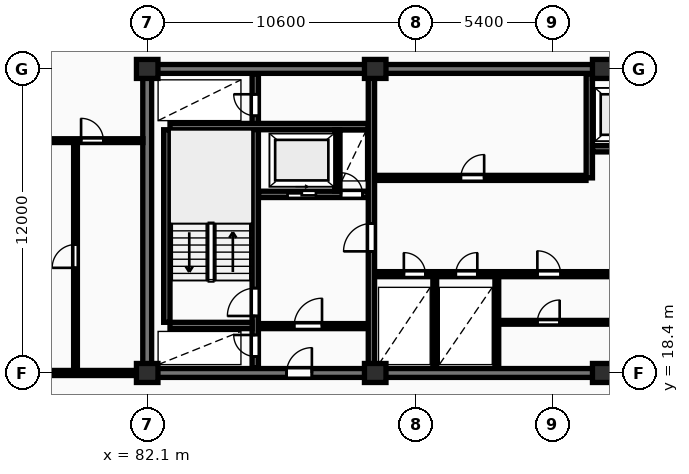
"""IFC4 building model, lengths in metres.
Left out: names, types, materials, properties, quantities, classifications, styles, units other than length and angle.
Written with IfcOpenShell. Run it as: python <this file> out.ifc"""

import sys

from ifc_helpers import new_model, si_unit, direction, frame, frame_2d, origin, origin_2d, place, context, subcontext, project, spatial, rectangle, extrude, element, fill, save


model = new_model("IFC4")
c1 = context("Model", 3, precision=1e-05, world=origin(), true_north=direction((0.0, 1.0)))
c2 = subcontext(c1, "Body", "Model", "MODEL_VIEW")
j1 = project(units=[si_unit("LENGTHUNIT", "METRE"), si_unit("PLANEANGLEUNIT", "RADIAN")], contexts=[c1])
p1 = place(None, origin())
s1 = spatial("IfcSite", under=j1, at=p1, CompositionType="ELEMENT")
p2 = place(p1, origin())
s2 = spatial("IfcBuilding", under=s1, at=p2, CompositionType="ELEMENT")
p3 = place(p2, frame((0.0, 0.0, 100.3)))
s3 = spatial("IfcBuildingStorey", under=s2, at=p3, CompositionType="ELEMENT", Elevation=100.3)
for number, where, z_axis, x_axis in (
    (1, (82.1, 18.4, 0.0), (0.0, 0.0, 1.0), (1.0, 0.0, 0.0)),
    (2, (82.1, 30.4, 0.0), (0.0, 0.0, 1.0), (1.0, 0.0, 0.0)),
    (3, (91.1, 18.4, 0.0), (0.0, 0.0, 1.0), (1.0, 0.0, 0.0)),
    (4, (91.1, 30.4, 0.0), (0.0, 0.0, 1.0), (1.0, 0.0, 0.0)),
    (5, (100.1, 18.4, 0.0), (0.0, 0.0, 1.0), (1.0, 0.0, 0.0)),
    (6, (100.1, 30.4, 0.0), (0.0, 0.0, 1.0), (1.0, 0.0, 0.0)),
):
    element("IfcColumn", number, at=place(p3, frame(where, z_axis=z_axis, x_axis=x_axis)), inside=s3, PredefinedType="COLUMN", context=c2, shape_type="SweptSolid", body=[
        extrude(rectangle(XDim=0.85, YDim=0.75, at=origin_2d()), origin(), (0.0, 0.0, 1.0), 3.25),
    ])
p4 = place(p3, frame((81.925, 30.4, 0.0), z_axis=(0.0, 0.0, 1.0), x_axis=(1.0, 0.0, 0.0)))
e7 = element("IfcWall", 7, at=p4, inside=s3, PredefinedType="SHEAR", context=c2, shape_type="SweptSolid", body=[
    extrude(rectangle(XDim=36.265, YDim=0.35, at=frame_2d((18.132, 0.0))), origin(), (0.0, 0.0, 1.0), 3.25),
])
p5 = place(p3, frame((82.1, 18.575, 0.0), z_axis=(0.0, 0.0, 1.0), x_axis=(0.0, 1.0, 0.0)))
e8 = element("IfcWall", 8, at=p5, inside=s3, PredefinedType="SHEAR", context=c2, shape_type="SweptSolid", body=[
    extrude(rectangle(XDim=11.65, YDim=0.35, at=frame_2d((5.825, 0.0))), origin(), (0.0, 0.0, 1.0), 3.25),
])
p6 = place(p3, frame((81.925, 18.4, 0.0), z_axis=(0.0, 0.0, 1.0), x_axis=(1.0, 0.0, 0.0)))
e9 = element("IfcWall", 9, at=p6, inside=s3, PredefinedType="SHEAR", context=c2, shape_type="SweptSolid", body=[
    extrude(rectangle(XDim=36.265, YDim=0.35, at=frame_2d((18.132, 0.0))), origin(), (0.0, 0.0, 1.0), 3.25),
])
p7 = place(p6, frame((5.675, 0.0, 0.0)))
e10 = element("IfcOpeningElement", 10, at=p7, cuts=e9, PredefinedType="OPENING", context=c2, shape_type="SweptSolid", body=[
    extrude(rectangle(XDim=1.0, YDim=2.15, at=frame_2d((0.5, 1.075))), frame((0.0, 0.185, 0.0), z_axis=(0.0, -1.0, 0.0), x_axis=(1.0, 0.0, 0.0)), (0.0, 0.0, 1.0), 0.37),
])
p8 = place(p6, frame((21.925, 0.0, 0.0)))
e11 = element("IfcOpeningElement", 11, at=p8, cuts=e9, PredefinedType="OPENING", context=c2, shape_type="SweptSolid", body=[
    extrude(rectangle(XDim=1.5, YDim=2.2, at=frame_2d((0.75, 1.1))), frame((0.0, 0.185, 0.0), z_axis=(0.0, -1.0, 0.0), x_axis=(1.0, 0.0, 0.0)), (0.0, 0.0, 1.0), 0.37),
])
p9 = place(p6, frame((29.875, 0.0, 0.0)))
e12 = element("IfcOpeningElement", 12, at=p9, cuts=e9, PredefinedType="OPENING", context=c2, shape_type="SweptSolid", body=[
    extrude(rectangle(XDim=1.0, YDim=2.15, at=frame_2d((0.5, 1.075))), frame((0.0, 0.185, 0.0), z_axis=(0.0, -1.0, 0.0), x_axis=(1.0, 0.0, 0.0)), (0.0, 0.0, 1.0), 0.37),
])
p10 = place(p3, frame((82.875, 20.4, 0.0), z_axis=(0.0, 0.0, 1.0), x_axis=(0.0, 1.0, 0.0)))
e13 = element("IfcWall", 13, at=p10, inside=s3, PredefinedType="SHEAR", context=c2, shape_type="SweptSolid", body=[
    extrude(rectangle(XDim=7.6, YDim=0.25, at=frame_2d((3.8, 0.0))), origin(), (0.0, 0.0, 1.0), 3.25),
])
p11 = place(p3, frame((86.365, 18.6, 0.0), z_axis=(0.0, 0.0, 1.0), x_axis=(0.0, 1.0, 0.0)))
e14 = element("IfcWall", 14, at=p11, inside=s3, PredefinedType="SHEAR", context=c2, shape_type="SweptSolid", body=[
    extrude(rectangle(XDim=11.6, YDim=0.25, at=frame_2d((5.8, 0.0))), origin(), (0.0, 0.0, 1.0), 3.25),
])
p12 = place(p11, frame((0.45, 0.0, 0.0)))
e15 = element("IfcOpeningElement", 15, at=p12, cuts=e14, PredefinedType="OPENING", context=c2, shape_type="SweptSolid", body=[
    extrude(rectangle(XDim=0.85, YDim=2.05, at=frame_2d((0.425, 1.025))), frame((0.0, 0.135, 0.0), z_axis=(0.0, -1.0, 0.0), x_axis=(1.0, 0.0, 0.0)), (0.0, 0.0, 1.0), 0.27),
])
p13 = place(p11, frame((2.05, 0.0, 0.0)))
e16 = element("IfcOpeningElement", 16, at=p13, cuts=e14, PredefinedType="OPENING", context=c2, shape_type="SweptSolid", body=[
    extrude(rectangle(XDim=1.1, YDim=2.1, at=frame_2d((0.55, 1.05))), frame((0.0, 0.135, 0.0), z_axis=(0.0, -1.0, 0.0), x_axis=(1.0, 0.0, 0.0)), (0.0, 0.0, 1.0), 0.27),
])
p14 = place(p11, frame((9.95, 0.0, 0.0)))
e17 = element("IfcOpeningElement", 17, at=p14, cuts=e14, PredefinedType="OPENING", context=c2, shape_type="SweptSolid", body=[
    extrude(rectangle(XDim=0.85, YDim=2.05, at=frame_2d((0.425, 1.025))), frame((0.0, 0.135, 0.0), z_axis=(0.0, -1.0, 0.0), x_axis=(1.0, 0.0, 0.0)), (0.0, 0.0, 1.0), 0.27),
])
p15 = place(p3, frame((83.0, 20.275, 0.0), z_axis=(0.0, 0.0, 1.0), x_axis=(1.0, 0.0, 0.0)))
e18 = element("IfcWall", 18, at=p15, inside=s3, PredefinedType="SHEAR", context=c2, shape_type="SweptSolid", body=[
    extrude(rectangle(XDim=3.24, YDim=0.25, at=frame_2d((1.62, 0.0))), origin(), (0.0, 0.0, 1.0), 3.25),
])
p16 = place(p3, frame((83.0, 28.125, 0.0), z_axis=(0.0, 0.0, 1.0), x_axis=(1.0, 0.0, 0.0)))
e19 = element("IfcWall", 19, at=p16, inside=s3, PredefinedType="SHEAR", context=c2, shape_type="SweptSolid", body=[
    extrude(rectangle(XDim=7.82, YDim=0.25, at=frame_2d((3.91, 0.0))), origin(), (0.0, 0.0, 1.0), 3.25),
])
p17 = place(p3, frame((86.5, 25.45, 0.0), z_axis=(0.0, 0.0, 1.0), x_axis=(1.0, 0.0, 0.0)))
e20 = element("IfcWall", 20, at=p17, inside=s3, PredefinedType="SHEAR", context=c2, shape_type="SweptSolid", body=[
    extrude(rectangle(XDim=4.32, YDim=0.25, at=frame_2d((2.16, 0.0))), origin(), (0.0, 0.0, 1.0), 3.25),
])
p18 = place(p17, frame((1.14, 0.0, 0.0)))
e21 = element("IfcOpeningElement", 21, at=p18, cuts=e20, PredefinedType="OPENING", context=c2, shape_type="SweptSolid", body=[
    extrude(rectangle(XDim=1.12, YDim=2.12, at=frame_2d((0.56, 1.06))), frame((0.0, 0.135, 0.0), z_axis=(0.0, -1.0, 0.0), x_axis=(1.0, 0.0, 0.0)), (0.0, 0.0, 1.0), 0.27),
])
p19 = place(p17, frame((3.25, 0.0, 0.0)))
e22 = element("IfcOpeningElement", 22, at=p19, cuts=e20, PredefinedType="OPENING", context=c2, shape_type="SweptSolid", body=[
    extrude(rectangle(XDim=0.85, YDim=2.05, at=frame_2d((0.425, 1.025))), frame((0.0, 0.135, 0.0), z_axis=(0.0, -1.0, 0.0), x_axis=(1.0, 0.0, 0.0)), (0.0, 0.0, 1.0), 0.27),
])
p20 = place(p3, frame((89.6, 25.58, 0.0), z_axis=(0.0, 0.0, 1.0), x_axis=(0.0, 1.0, 0.0)))
e23 = element("IfcWall", 23, at=p20, inside=s3, PredefinedType="PARTITIONING", context=c2, shape_type="SweptSolid", body=[
    extrude(rectangle(XDim=2.42, YDim=0.2, at=frame_2d((1.21, 0.0))), origin(), (0.0, 0.0, 1.0), 2.97),
])
p21 = place(p3, frame((86.5, 20.25, 0.0), z_axis=(0.0, 0.0, 1.0), x_axis=(1.0, 0.0, 0.0)))
e24 = element("IfcWall", 24, at=p21, inside=s3, PredefinedType="PARTITIONING", context=c2, shape_type="SweptSolid", body=[
    extrude(rectangle(XDim=4.32, YDim=0.2, at=frame_2d((2.16, 0.0))), origin(), (0.0, 0.0, 1.0), 2.97),
])
p22 = place(p21, frame((1.4, 0.0, 0.0)))
e25 = element("IfcOpeningElement", 25, at=p22, cuts=e24, PredefinedType="OPENING", context=c2, shape_type="SweptSolid", body=[
    extrude(rectangle(XDim=1.1, YDim=2.1, at=frame_2d((0.55, 1.05))), frame((0.0, 0.11, 0.0), z_axis=(0.0, -1.0, 0.0), x_axis=(1.0, 0.0, 0.0)), (0.0, 0.0, 1.0), 0.22),
])
p23 = place(p3, frame((90.95, 18.6, 0.0), z_axis=(0.0, 0.0, 1.0), x_axis=(0.0, 1.0, 0.0)))
e26 = element("IfcWall", 26, at=p23, inside=s3, PredefinedType="SHEAR", context=c2, shape_type="SweptSolid", body=[
    extrude(rectangle(XDim=11.6, YDim=0.25, at=frame_2d((5.8, 0.0))), origin(), (0.0, 0.0, 1.0), 3.25),
])
p24 = place(p23, frame((4.6, 0.0, 0.0)))
e27 = element("IfcOpeningElement", 27, at=p24, cuts=e26, PredefinedType="OPENING", context=c2, shape_type="SweptSolid", body=[
    extrude(rectangle(XDim=1.1, YDim=2.1, at=frame_2d((0.55, 1.05))), frame((0.0, 0.135, 0.0), z_axis=(0.0, -1.0, 0.0), x_axis=(1.0, 0.0, 0.0)), (0.0, 0.0, 1.0), 0.27),
])
p25 = place(p3, frame((91.08, 26.1, 0.0), z_axis=(0.0, 0.0, 1.0), x_axis=(1.0, 0.0, 0.0)))
e28 = element("IfcWall", 28, at=p25, inside=s3, PredefinedType="PARTITIONING", context=c2, shape_type="SweptSolid", body=[
    extrude(rectangle(XDim=8.34, YDim=0.2, at=frame_2d((4.17, 0.0))), origin(), (0.0, 0.0, 1.0), 2.97),
])
p26 = place(p25, frame((3.4, 0.0, 0.0)))
e29 = element("IfcOpeningElement", 29, at=p26, cuts=e28, PredefinedType="OPENING", context=c2, shape_type="SweptSolid", body=[
    extrude(rectangle(XDim=0.92, YDim=2.08, at=frame_2d((0.46, 1.04))), frame((0.0, 0.11, 0.0), z_axis=(0.0, -1.0, 0.0), x_axis=(1.0, 0.0, 0.0)), (0.0, 0.0, 1.0), 0.22),
])
p27 = place(p3, frame((99.55, 26.1, 0.0), z_axis=(0.0, 0.0, 1.0), x_axis=(0.0, 1.0, 0.0)))
e30 = element("IfcWall", 30, at=p27, inside=s3, PredefinedType="SHEAR", context=c2, shape_type="SweptSolid", body=[
    extrude(rectangle(XDim=4.1, YDim=0.25, at=frame_2d((2.05, 0.0))), origin(), (0.0, 0.0, 1.0), 3.25),
])
p28 = place(p3, frame((99.68, 27.25, 0.0), z_axis=(0.0, 0.0, 1.0), x_axis=(1.0, 0.0, 0.0)))
e31 = element("IfcWall", 31, at=p28, inside=s3, PredefinedType="SHEAR", context=c2, shape_type="SweptSolid", body=[
    extrude(rectangle(XDim=10.54, YDim=0.25, at=frame_2d((5.27, 0.0))), origin(), (0.0, 0.0, 1.0), 3.25),
])
p29 = place(p28, frame((0.76, 0.0, 0.0)))
e32 = element("IfcOpeningElement", 32, at=p29, cuts=e31, PredefinedType="OPENING", context=c2, shape_type="SweptSolid", body=[
    extrude(rectangle(XDim=1.12, YDim=2.12, at=frame_2d((0.56, 1.06))), frame((0.0, 0.135, 0.0), z_axis=(0.0, -1.0, 0.0), x_axis=(1.0, 0.0, 0.0)), (0.0, 0.0, 1.0), 0.27),
])
p30 = place(p28, frame((3.56, 0.0, 0.0)))
e33 = element("IfcOpeningElement", 33, at=p30, cuts=e31, PredefinedType="OPENING", context=c2, shape_type="SweptSolid", body=[
    extrude(rectangle(XDim=1.12, YDim=2.12, at=frame_2d((0.56, 1.06))), frame((0.0, 0.135, 0.0), z_axis=(0.0, -1.0, 0.0), x_axis=(1.0, 0.0, 0.0)), (0.0, 0.0, 1.0), 0.27),
])
p31 = place(p28, frame((6.36, 0.0, 0.0)))
e34 = element("IfcOpeningElement", 34, at=p31, cuts=e31, PredefinedType="OPENING", context=c2, shape_type="SweptSolid", body=[
    extrude(rectangle(XDim=1.12, YDim=2.12, at=frame_2d((0.56, 1.06))), frame((0.0, 0.135, 0.0), z_axis=(0.0, -1.0, 0.0), x_axis=(1.0, 0.0, 0.0)), (0.0, 0.0, 1.0), 0.27),
])
p32 = place(p28, frame((8.92, 0.0, 0.0)))
e35 = element("IfcOpeningElement", 35, at=p32, cuts=e31, PredefinedType="OPENING", context=c2, shape_type="SweptSolid", body=[
    extrude(rectangle(XDim=0.85, YDim=2.05, at=frame_2d((0.425, 1.025))), frame((0.0, 0.135, 0.0), z_axis=(0.0, -1.0, 0.0), x_axis=(1.0, 0.0, 0.0)), (0.0, 0.0, 1.0), 0.27),
])
for number, where, z_axis, x_axis in (
    (36, (93.45, 18.6, 0.0), (0.0, 0.0, 1.0), (0.0, 1.0, 0.0)),
    (37, (95.9, 18.6, 0.0), (0.0, 0.0, 1.0), (0.0, 1.0, 0.0)),
):
    element("IfcWall", number, at=place(p3, frame(where, z_axis=z_axis, x_axis=x_axis)), inside=s3, PredefinedType="PARTITIONING", context=c2, shape_type="SweptSolid", body=[
        extrude(rectangle(XDim=3.6, YDim=0.15, at=frame_2d((1.8, 0.0))), origin(), (0.0, 0.0, 1.0), 2.97),
    ])
p33 = place(p3, frame((95.9, 20.4, 0.0), z_axis=(0.0, 0.0, 1.0), x_axis=(1.0, 0.0, 0.0)))
e38 = element("IfcWall", 38, at=p33, inside=s3, PredefinedType="PARTITIONING", context=c2, shape_type="SweptSolid", body=[
    extrude(rectangle(XDim=6.7, YDim=0.15, at=frame_2d((3.35, 0.0))), origin(), (0.0, 0.0, 1.0), 2.97),
])
p34 = place(p33, frame((1.6, 0.0, 0.0)))
e39 = element("IfcOpeningElement", 39, at=p34, cuts=e38, PredefinedType="OPENING", context=c2, shape_type="SweptSolid", body=[
    extrude(rectangle(XDim=0.88, YDim=2.06, at=frame_2d((0.44, 1.03))), frame((0.0, 0.085, 0.0), z_axis=(0.0, -1.0, 0.0), x_axis=(1.0, 0.0, 0.0)), (0.0, 0.0, 1.0), 0.17),
])
p35 = place(p3, frame((91.08, 22.3, 0.0), z_axis=(0.0, 0.0, 1.0), x_axis=(1.0, 0.0, 0.0)))
e40 = element("IfcWall", 40, at=p35, inside=s3, PredefinedType="PARTITIONING", context=c2, shape_type="SweptSolid", body=[
    extrude(rectangle(XDim=19.14, YDim=0.2, at=frame_2d((9.57, 0.0))), origin(), (0.0, 0.0, 1.0), 2.97),
])
p36 = place(p35, frame((1.15, 0.0, 0.0)))
e41 = element("IfcOpeningElement", 41, at=p36, cuts=e40, PredefinedType="OPENING", context=c2, shape_type="SweptSolid", body=[
    extrude(rectangle(XDim=0.85, YDim=2.05, at=frame_2d((0.425, 1.025))), frame((0.0, 0.11, 0.0), z_axis=(0.0, -1.0, 0.0), x_axis=(1.0, 0.0, 0.0)), (0.0, 0.0, 1.0), 0.22),
])
p37 = place(p35, frame((3.2, 0.0, 0.0)))
e42 = element("IfcOpeningElement", 42, at=p37, cuts=e40, PredefinedType="OPENING", context=c2, shape_type="SweptSolid", body=[
    extrude(rectangle(XDim=0.85, YDim=2.05, at=frame_2d((0.425, 1.025))), frame((0.0, 0.11, 0.0), z_axis=(0.0, -1.0, 0.0), x_axis=(1.0, 0.0, 0.0)), (0.0, 0.0, 1.0), 0.22),
])
p38 = place(p35, frame((12.72, 0.0, 0.0)))
e43 = element("IfcOpeningElement", 43, at=p38, cuts=e40, PredefinedType="OPENING", context=c2, shape_type="SweptSolid", body=[
    extrude(rectangle(XDim=1.5, YDim=2.2, at=frame_2d((0.75, 1.1))), frame((0.0, 0.11, 0.0), z_axis=(0.0, -1.0, 0.0), x_axis=(1.0, 0.0, 0.0)), (0.0, 0.0, 1.0), 0.22),
])
p39 = place(p35, frame((6.42, 0.0, 0.0)))
e44 = element("IfcOpeningElement", 44, at=p39, cuts=e40, PredefinedType="OPENING", context=c2, shape_type="SweptSolid", body=[
    extrude(rectangle(XDim=0.92, YDim=2.08, at=frame_2d((0.46, 1.04))), frame((0.0, 0.11, 0.0), z_axis=(0.0, -1.0, 0.0), x_axis=(1.0, 0.0, 0.0)), (0.0, 0.0, 1.0), 0.22),
])
p40 = place(p35, frame((15.92, 0.0, 0.0)))
e45 = element("IfcOpeningElement", 45, at=p40, cuts=e40, PredefinedType="OPENING", context=c2, shape_type="SweptSolid", body=[
    extrude(rectangle(XDim=0.88, YDim=2.06, at=frame_2d((0.44, 1.03))), frame((0.0, 0.11, 0.0), z_axis=(0.0, -1.0, 0.0), x_axis=(1.0, 0.0, 0.0)), (0.0, 0.0, 1.0), 0.22),
])
p41 = place(p3, frame((79.27, 18.45, 0.0), z_axis=(0.0, 0.0, 1.0), x_axis=(0.0, 1.0, 0.0)))
e46 = element("IfcWall", 46, at=p41, inside=s3, PredefinedType="PARTITIONING", context=c2, shape_type="SweptSolid", body=[
    extrude(rectangle(XDim=9.12, YDim=0.15, at=frame_2d((4.56, 0.0))), origin(), (0.0, 0.0, 1.0), 2.97),
])
p42 = place(p41, frame((4.1, 0.0, 0.0)))
e47 = element("IfcOpeningElement", 47, at=p42, cuts=e46, PredefinedType="OPENING", context=c2, shape_type="SweptSolid", body=[
    extrude(rectangle(XDim=0.92, YDim=2.08, at=frame_2d((0.46, 1.04))), frame((0.0, 0.085, 0.0), z_axis=(0.0, -1.0, 0.0), x_axis=(1.0, 0.0, 0.0)), (0.0, 0.0, 1.0), 0.17),
])
p43 = place(p3, frame((75.17, 27.57, 0.0), z_axis=(0.0, 0.0, 1.0), x_axis=(1.0, 0.0, 0.0)))
e48 = element("IfcWall", 48, at=p43, inside=s3, PredefinedType="PARTITIONING", context=c2, shape_type="SweptSolid", body=[
    extrude(rectangle(XDim=6.76, YDim=0.15, at=frame_2d((3.38, 0.0))), origin(), (0.0, 0.0, 1.0), 2.97),
])
p44 = place(p43, frame((1.266, 0.0, 0.0)))
e49 = element("IfcOpeningElement", 49, at=p44, cuts=e48, PredefinedType="OPENING", context=c2, shape_type="SweptSolid", body=[
    extrude(rectangle(XDim=0.84, YDim=2.04, at=frame_2d((0.42, 1.02))), frame((0.0, 0.085, 0.0), z_axis=(0.0, -1.0, 0.0), x_axis=(1.0, 0.0, 0.0)), (0.0, 0.0, 1.0), 0.17),
])
p45 = place(p43, frame((4.32, 0.0, 0.0)))
e50 = element("IfcOpeningElement", 50, at=p45, cuts=e48, PredefinedType="OPENING", context=c2, shape_type="SweptSolid", body=[
    extrude(rectangle(XDim=0.88, YDim=2.06, at=frame_2d((0.44, 1.03))), frame((0.0, 0.085, 0.0), z_axis=(0.0, -1.0, 0.0), x_axis=(1.0, 0.0, 0.0)), (0.0, 0.0, 1.0), 0.17),
])
p46 = place(p3, frame((72.7, 18.4, 0.0), z_axis=(0.0, 0.0, 1.0), x_axis=(1.0, 0.0, 0.0)))
e51 = element("IfcWall", 51, at=p46, inside=s3, PredefinedType="PARTITIONING", context=c2, shape_type="SweptSolid", body=[
    extrude(rectangle(XDim=9.25, YDim=0.2, at=frame_2d((4.625, 0.0))), origin(), (0.0, 0.0, 1.0), 2.358),
])
p47 = place(p46, frame((4.15, 0.0, 0.0)))
e52 = element("IfcOpeningElement", 52, at=p47, cuts=e51, PredefinedType="OPENING", context=c2, shape_type="SweptSolid", body=[
    extrude(rectangle(XDim=0.95, YDim=2.15, at=frame_2d((0.475, 1.075))), frame((0.0, 0.11, 0.0), z_axis=(0.0, -1.0, 0.0), x_axis=(1.0, 0.0, 0.0)), (0.0, 0.0, 1.0), 0.22),
])
p48 = place(p7, origin())
e53 = element("IfcDoor", 53, at=p48, inside=s3, OperationType="SINGLE_SWING_RIGHT", PredefinedType="DOOR", context=c2, shape_type="SweptSolid", body=[
    extrude(rectangle(XDim=1.0, YDim=2.15, at=frame_2d((0.5, 1.075))), frame((0.0, 0.025, 0.0), z_axis=(0.0, -1.0, 0.0), x_axis=(1.0, 0.0, 0.0)), (0.0, 0.0, 1.0), 0.05),
])
fill(e10, e53)
p49 = place(p12, origin())
e54 = element("IfcDoor", 54, at=p49, inside=s3, OperationType="SINGLE_SWING_RIGHT", PredefinedType="DOOR", context=c2, shape_type="SweptSolid", body=[
    extrude(rectangle(XDim=0.85, YDim=2.05, at=frame_2d((0.425, 1.025))), frame((0.0, 0.025, 0.0), z_axis=(0.0, -1.0, 0.0), x_axis=(1.0, 0.0, 0.0)), (0.0, 0.0, 1.0), 0.05),
])
fill(e15, e54)
p50 = place(p13, origin())
e55 = element("IfcDoor", 55, at=p50, inside=s3, OperationType="SINGLE_SWING_LEFT", PredefinedType="DOOR", context=c2, shape_type="SweptSolid", body=[
    extrude(rectangle(XDim=1.1, YDim=2.1, at=frame_2d((0.55, 1.05))), frame((0.0, 0.025, 0.0), z_axis=(0.0, -1.0, 0.0), x_axis=(1.0, 0.0, 0.0)), (0.0, 0.0, 1.0), 0.05),
])
fill(e16, e55)
p51 = place(p14, origin())
e56 = element("IfcDoor", 56, at=p51, inside=s3, OperationType="SINGLE_SWING_RIGHT", PredefinedType="DOOR", context=c2, shape_type="SweptSolid", body=[
    extrude(rectangle(XDim=0.85, YDim=2.05, at=frame_2d((0.425, 1.025))), frame((0.0, 0.025, 0.0), z_axis=(0.0, -1.0, 0.0), x_axis=(1.0, 0.0, 0.0)), (0.0, 0.0, 1.0), 0.05),
])
fill(e17, e56)
p52 = place(p18, origin())
e57 = element("IfcDoor", 57, at=p52, inside=s3, OperationType="SLIDING_TO_RIGHT", PredefinedType="DOOR", context=c2, shape_type="SweptSolid", body=[
    extrude(rectangle(XDim=1.12, YDim=2.12, at=frame_2d((0.56, 1.06))), frame((0.0, 0.025, 0.0), z_axis=(0.0, -1.0, 0.0), x_axis=(1.0, 0.0, 0.0)), (0.0, 0.0, 1.0), 0.05),
])
fill(e21, e57)
p53 = place(p19, origin())
e58 = element("IfcDoor", 58, at=p53, inside=s3, OperationType="SINGLE_SWING_LEFT", PredefinedType="DOOR", context=c2, shape_type="SweptSolid", body=[
    extrude(rectangle(XDim=0.85, YDim=2.05, at=frame_2d((0.425, 1.025))), frame((0.0, 0.025, 0.0), z_axis=(0.0, -1.0, 0.0), x_axis=(1.0, 0.0, 0.0)), (0.0, 0.0, 1.0), 0.05),
])
fill(e22, e58)
p54 = place(p22, origin())
e59 = element("IfcDoor", 59, at=p54, inside=s3, OperationType="SINGLE_SWING_RIGHT", PredefinedType="DOOR", context=c2, shape_type="SweptSolid", body=[
    extrude(rectangle(XDim=1.1, YDim=2.1, at=frame_2d((0.55, 1.05))), frame((0.0, 0.025, 0.0), z_axis=(0.0, -1.0, 0.0), x_axis=(1.0, 0.0, 0.0)), (0.0, 0.0, 1.0), 0.05),
])
fill(e25, e59)
p55 = place(p24, origin())
e60 = element("IfcDoor", 60, at=p55, inside=s3, OperationType="SINGLE_SWING_LEFT", PredefinedType="DOOR", context=c2, shape_type="SweptSolid", body=[
    extrude(rectangle(XDim=1.1, YDim=2.1, at=frame_2d((0.55, 1.05))), frame((0.0, 0.025, 0.0), z_axis=(0.0, -1.0, 0.0), x_axis=(1.0, 0.0, 0.0)), (0.0, 0.0, 1.0), 0.05),
])
fill(e27, e60)
p56 = place(p26, origin())
e61 = element("IfcDoor", 61, at=p56, inside=s3, OperationType="SINGLE_SWING_RIGHT", PredefinedType="DOOR", context=c2, shape_type="SweptSolid", body=[
    extrude(rectangle(XDim=0.92, YDim=2.08, at=frame_2d((0.46, 1.04))), frame((0.0, 0.025, 0.0), z_axis=(0.0, -1.0, 0.0), x_axis=(1.0, 0.0, 0.0)), (0.0, 0.0, 1.0), 0.05),
])
fill(e29, e61)
p57 = place(p34, origin())
e62 = element("IfcDoor", 62, at=p57, inside=s3, OperationType="SINGLE_SWING_RIGHT", PredefinedType="DOOR", context=c2, shape_type="SweptSolid", body=[
    extrude(rectangle(XDim=0.88, YDim=2.06, at=frame_2d((0.44, 1.03))), frame((0.0, 0.025, 0.0), z_axis=(0.0, -1.0, 0.0), x_axis=(1.0, 0.0, 0.0)), (0.0, 0.0, 1.0), 0.05),
])
fill(e39, e62)
p58 = place(p36, origin())
e63 = element("IfcDoor", 63, at=p58, inside=s3, OperationType="SINGLE_SWING_LEFT", PredefinedType="DOOR", context=c2, shape_type="SweptSolid", body=[
    extrude(rectangle(XDim=0.85, YDim=2.05, at=frame_2d((0.425, 1.025))), frame((0.0, 0.025, 0.0), z_axis=(0.0, -1.0, 0.0), x_axis=(1.0, 0.0, 0.0)), (0.0, 0.0, 1.0), 0.05),
])
fill(e41, e63)
p59 = place(p37, origin())
e64 = element("IfcDoor", 64, at=p59, inside=s3, OperationType="SINGLE_SWING_RIGHT", PredefinedType="DOOR", context=c2, shape_type="SweptSolid", body=[
    extrude(rectangle(XDim=0.85, YDim=2.05, at=frame_2d((0.425, 1.025))), frame((0.0, 0.025, 0.0), z_axis=(0.0, -1.0, 0.0), x_axis=(1.0, 0.0, 0.0)), (0.0, 0.0, 1.0), 0.05),
])
fill(e42, e64)
p60 = place(p39, origin())
e65 = element("IfcDoor", 65, at=p60, inside=s3, OperationType="SINGLE_SWING_LEFT", PredefinedType="DOOR", context=c2, shape_type="SweptSolid", body=[
    extrude(rectangle(XDim=0.92, YDim=2.08, at=frame_2d((0.46, 1.04))), frame((0.0, 0.025, 0.0), z_axis=(0.0, -1.0, 0.0), x_axis=(1.0, 0.0, 0.0)), (0.0, 0.0, 1.0), 0.05),
])
fill(e44, e65)
p61 = place(p42, origin())
e66 = element("IfcDoor", 66, at=p61, inside=s3, OperationType="SINGLE_SWING_LEFT", PredefinedType="DOOR", context=c2, shape_type="SweptSolid", body=[
    extrude(rectangle(XDim=0.92, YDim=2.08, at=frame_2d((0.46, 1.04))), frame((0.0, 0.025, 0.0), z_axis=(0.0, -1.0, 0.0), x_axis=(1.0, 0.0, 0.0)), (0.0, 0.0, 1.0), 0.05),
])
fill(e47, e66)
p62 = place(p45, origin())
e67 = element("IfcDoor", 67, at=p62, inside=s3, OperationType="SINGLE_SWING_LEFT", PredefinedType="DOOR", context=c2, shape_type="SweptSolid", body=[
    extrude(rectangle(XDim=0.88, YDim=2.06, at=frame_2d((0.44, 1.03))), frame((0.0, 0.025, 0.0), z_axis=(0.0, -1.0, 0.0), x_axis=(1.0, 0.0, 0.0)), (0.0, 0.0, 1.0), 0.05),
])
fill(e50, e67)
save(model, sys.argv[1])
